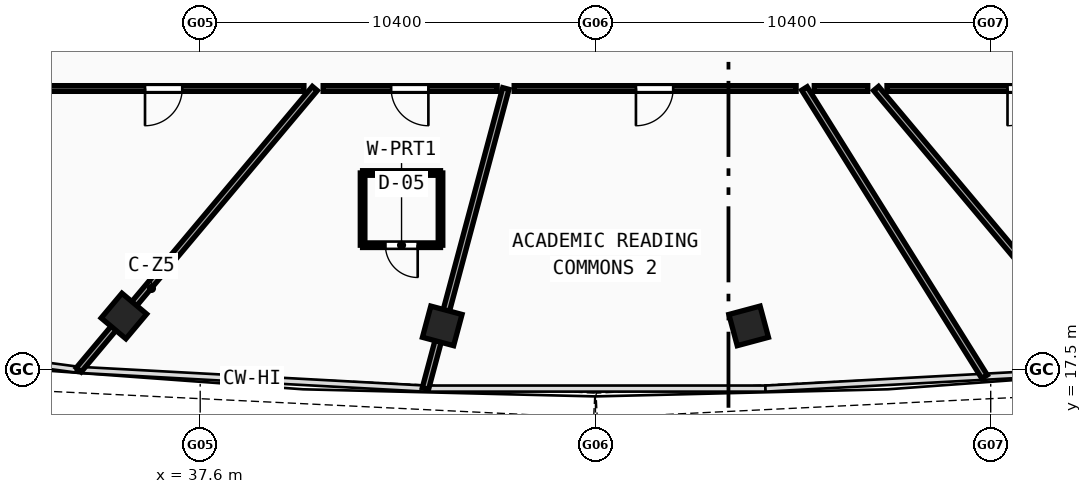
"""IFC4 building model, lengths in metres.
Left out: names, types, materials, properties, quantities, classifications, styles, units other than length and angle.
Written with IfcOpenShell. Run it as: python <this file> out.ifc"""

import sys

from ifc_helpers import new_model, si_unit, direction, frame, frame_2d, origin, origin_with_axes, origin_2d, place, context, subcontext, project, spatial, rectangle, hollow_rectangle, extrude, source, transform, mapped, element, fill, save


model = new_model("IFC4")
c1 = context("Model", 3, precision=1e-05, world=origin(), true_north=direction((0.0, 1.0)))
c2 = subcontext(c1, "Body", "Model", "MODEL_VIEW")
j1 = project(units=[si_unit("LENGTHUNIT", "METRE"), si_unit("PLANEANGLEUNIT", "RADIAN")], contexts=[c1])
p1 = place(None, origin())
s1 = spatial("IfcSite", under=j1, at=p1, CompositionType="ELEMENT")
p2 = place(p1, origin())
s2 = spatial("IfcBuilding", under=s1, at=p2, CompositionType="ELEMENT")
p3 = place(p2, frame((0.0, 0.0, 259.45)))
s3 = spatial("IfcBuildingStorey", under=s2, at=p3, CompositionType="ELEMENT", Elevation=259.45)
m1 = source(origin(), c2, "Body", "SweptSolid", [
    extrude(hollow_rectangle(XDim=0.85, YDim=0.85, WallThickness=0.034, at=origin_2d()), origin(), (0.0, 0.0, 1.0), 3.73),
])
for number, where, z_axis, x_axis in (
    (1, (35.593, 18.914, -0.26), (0.0, 0.0, 1.0), (0.766, -0.643, 0.0)),
    (2, (43.969, 18.654, -0.26), (0.0, 0.0, 1.0), (0.966, -0.259, 0.0)),
    (3, (52.031, 18.654, -0.26), (0.0, 0.0, 1.0), (0.966, 0.259, 0.0)),
):
    element("IfcColumn", number, at=place(p3, frame(where, z_axis=z_axis, x_axis=x_axis)), inside=s3, PredefinedType="COLUMN", context=c2, shape_type="MappedRepresentation", body=[
        mapped(m1, transform((0.0, 0.0, 0.0), scale=1.0)),
    ])
p4 = place(p3, frame((40.616, 24.9, 0.0), z_axis=(0.0, 0.0, 1.0), x_axis=(-0.642795010628, -0.766038232931, 0.0)))
e4 = element("IfcWall", 4, at=p4, inside=s3, PredefinedType="PARTITIONING", context=c2, shape_type="SweptSolid", body=[
    extrude(rectangle(XDim=9.663, YDim=0.17, at=frame_2d((4.832, 0.0))), origin(), (0.0, 0.0, 1.0), 2.82),
])
p5 = place(p3, frame((45.642, 24.9, 0.0), z_axis=(0.0, 0.0, 1.0), x_axis=(-0.258833622746, -0.965921920103, 0.0)))
e5 = element("IfcWall", 5, at=p5, inside=s3, PredefinedType="PARTITIONING", context=c2, shape_type="SweptSolid", body=[
    extrude(rectangle(XDim=8.174, YDim=0.17, at=frame_2d((4.087, 0.0))), origin(), (0.0, 0.0, 1.0), 2.82),
])
p6 = place(p3, frame((53.499, 24.9, 0.0), z_axis=(0.0, 0.0, 1.0), x_axis=(0.529920411872, -0.848047379031, 0.0)))
e6 = element("IfcWall", 6, at=p6, inside=s3, PredefinedType="PARTITIONING", context=c2, shape_type="SweptSolid", body=[
    extrude(rectangle(XDim=8.943, YDim=0.17, at=frame_2d((4.471, 0.0))), origin(), (0.0, 0.0, 1.0), 2.82),
])
p7 = place(p3, frame((55.384, 24.9, 0.0), z_axis=(0.0, 0.0, 1.0), x_axis=(0.642795010628, -0.766038232931, 0.0)))
e7 = element("IfcWall", 7, at=p7, inside=s3, PredefinedType="PARTITIONING", context=c2, shape_type="SweptSolid", body=[
    extrude(rectangle(XDim=9.663, YDim=0.17, at=frame_2d((4.832, 0.0))), origin(), (0.0, 0.0, 1.0), 2.82),
])
p8 = place(p3, frame((62.85, 24.9, 0.0), z_axis=(0.0, 0.0, 1.0), x_axis=(-1.0, 0.0, 0.0)))
e8 = element("IfcWall", 8, at=p8, inside=s3, PredefinedType="PARTITIONING", context=c2, shape_type="SweptSolid", body=[
    extrude(rectangle(XDim=7.179, YDim=0.15, at=frame_2d((3.589, 0.0))), origin(), (0.0, 0.0, 1.0), 3.12),
])
p9 = place(p8, frame((3.028, 0.0, 0.0)))
e9 = element("IfcOpeningElement", 9, at=p9, cuts=e8, PredefinedType="OPENING", context=c2, shape_type="SweptSolid", body=[
    extrude(rectangle(XDim=0.98, YDim=2.12, at=frame_2d((0.49, 1.06))), frame((0.0, 0.085, 0.0), z_axis=(0.0, -1.0, 0.0), x_axis=(1.0, 0.0, 0.0)), (0.0, 0.0, 1.0), 0.17),
])
p10 = place(p3, frame((55.164, 24.9, 0.0), z_axis=(0.0, 0.0, 1.0), x_axis=(-1.0, 0.0, 0.0)))
e10 = element("IfcWall", 10, at=p10, inside=s3, PredefinedType="PARTITIONING", context=c2, shape_type="SweptSolid", body=[
    extrude(rectangle(XDim=1.406, YDim=0.15, at=frame_2d((0.703, 0.0))), origin(), (0.0, 0.0, 1.0), 2.82),
])
p11 = place(p3, frame((53.279, 24.9, 0.0), z_axis=(0.0, 0.0, 1.0), x_axis=(-1.0, 0.0, 0.0)))
e11 = element("IfcWall", 11, at=p11, inside=s3, PredefinedType="PARTITIONING", context=c2, shape_type="SweptSolid", body=[
    extrude(rectangle(XDim=7.417, YDim=0.15, at=frame_2d((3.708, 0.0))), origin(), (0.0, 0.0, 1.0), 2.82),
])
p12 = place(p11, frame((3.234, 0.0, 0.0)))
e12 = element("IfcOpeningElement", 12, at=p12, cuts=e11, PredefinedType="OPENING", context=c2, shape_type="SweptSolid", body=[
    extrude(rectangle(XDim=0.98, YDim=2.12, at=frame_2d((0.49, 1.06))), frame((0.0, 0.085, 0.0), z_axis=(0.0, -1.0, 0.0), x_axis=(1.0, 0.0, 0.0)), (0.0, 0.0, 1.0), 0.17),
])
p13 = place(p3, frame((45.414, 24.9, 0.0), z_axis=(0.0, 0.0, 1.0), x_axis=(-1.0, 0.0, 0.0)))
e13 = element("IfcWall", 13, at=p13, inside=s3, PredefinedType="PARTITIONING", context=c2, shape_type="SweptSolid", body=[
    extrude(rectangle(XDim=4.579, YDim=0.15, at=frame_2d((2.289, 0.0))), origin(), (0.0, 0.0, 1.0), 2.82),
])
p14 = place(p13, frame((1.81, 0.0, 0.0)))
e14 = element("IfcOpeningElement", 14, at=p14, cuts=e13, PredefinedType="OPENING", context=c2, shape_type="SweptSolid", body=[
    extrude(rectangle(XDim=0.98, YDim=2.12, at=frame_2d((0.49, 1.06))), frame((0.0, 0.085, 0.0), z_axis=(0.0, -1.0, 0.0), x_axis=(1.0, 0.0, 0.0)), (0.0, 0.0, 1.0), 0.17),
])
p15 = place(p3, frame((40.329, 24.9, 0.0), z_axis=(0.0, 0.0, 1.0), x_axis=(-1.0, 0.0, 0.0)))
e15 = element("IfcWall", 15, at=p15, inside=s3, PredefinedType="PARTITIONING", context=c2, shape_type="SweptSolid", body=[
    extrude(rectangle(XDim=7.179, YDim=0.15, at=frame_2d((3.589, 0.0))), origin(), (0.0, 0.0, 1.0), 3.12),
])
p16 = place(p15, frame((3.201, 0.0, 0.0)))
e16 = element("IfcOpeningElement", 16, at=p16, cuts=e15, PredefinedType="OPENING", context=c2, shape_type="SweptSolid", body=[
    extrude(rectangle(XDim=0.98, YDim=2.12, at=frame_2d((0.49, 1.06))), frame((0.0, 0.085, 0.0), z_axis=(0.0, -1.0, 0.0), x_axis=(1.0, 0.0, 0.0)), (0.0, 0.0, 1.0), 0.17),
])
p17 = place(p3, frame((41.873, 20.777, 0.0), z_axis=(0.0, 0.0, 1.0), x_axis=(1.0, 0.0, 0.0)))
e17 = element("IfcWall", 17, at=p17, inside=s3, PredefinedType="PARTITIONING", context=c2, shape_type="SweptSolid", body=[
    extrude(rectangle(XDim=2.05, YDim=0.12, at=frame_2d((1.025, 0.0))), origin(), (0.0, 0.0, 1.0), 3.47),
])
p18 = place(p17, frame((0.6, 0.0, 0.0)))
e18 = element("IfcOpeningElement", 18, at=p18, cuts=e17, PredefinedType="OPENING", context=c2, shape_type="SweptSolid", body=[
    extrude(rectangle(XDim=0.85, YDim=2.1, at=frame_2d((0.425, 1.05))), frame((0.0, 0.07, 0.0), z_axis=(0.0, -1.0, 0.0), x_axis=(1.0, 0.0, 0.0)), (0.0, 0.0, 1.0), 0.14),
])
p19 = place(p3, frame((43.923, 20.777, 0.0), z_axis=(0.0, 0.0, 1.0), x_axis=(0.0, 1.0, 0.0)))
e19 = element("IfcWall", 19, at=p19, inside=s3, PredefinedType="PARTITIONING", context=c2, shape_type="SweptSolid", body=[
    extrude(rectangle(XDim=1.9, YDim=0.12, at=frame_2d((0.95, 0.0))), origin(), (0.0, 0.0, 1.0), 3.12),
])
p20 = place(p3, frame((43.923, 22.677, 0.0), z_axis=(0.0, 0.0, 1.0), x_axis=(-1.0, 0.0, 0.0)))
e20 = element("IfcWall", 20, at=p20, inside=s3, PredefinedType="PARTITIONING", context=c2, shape_type="SweptSolid", body=[
    extrude(rectangle(XDim=2.05, YDim=0.12, at=frame_2d((1.025, 0.0))), origin(), (0.0, 0.0, 1.0), 3.47),
])
p21 = place(p3, frame((41.873, 22.677, 0.0), z_axis=(0.0, 0.0, 1.0), x_axis=(0.0, -1.0, 0.0)))
e21 = element("IfcWall", 21, at=p21, inside=s3, PredefinedType="PARTITIONING", context=c2, shape_type="SweptSolid", body=[
    extrude(rectangle(XDim=1.9, YDim=0.12, at=frame_2d((0.95, 0.0))), origin(), (0.0, 0.0, 1.0), 3.12),
])
m2 = source(origin(), c2, "Body", "SweptSolid", [
    extrude(rectangle(XDim=0.98, YDim=2.12, at=frame_2d((0.49, 1.06))), frame((0.0, 0.025, 0.0), z_axis=(0.0, -1.0, 0.0), x_axis=(1.0, 0.0, 0.0)), (0.0, 0.0, 1.0), 0.05),
])
p22 = place(p16, origin_with_axes())
e22 = element("IfcDoor", 22, at=p22, inside=s3, OperationType="SINGLE_SWING_RIGHT", PredefinedType="DOOR", context=c2, shape_type="MappedRepresentation", body=[
    mapped(m2, transform((0.0, 0.0, 0.0), scale=1.0)),
])
fill(e16, e22)
p23 = place(p14, origin_with_axes())
e23 = element("IfcDoor", 23, at=p23, inside=s3, OperationType="SINGLE_SWING_LEFT", PredefinedType="DOOR", context=c2, shape_type="MappedRepresentation", body=[
    mapped(m2, transform((0.0, 0.0, 0.0), scale=1.0)),
])
fill(e14, e23)
m3 = source(origin(), c2, "Body", "SweptSolid", [
    extrude(rectangle(XDim=0.85, YDim=2.1, at=frame_2d((0.425, 1.05))), frame((0.0, 0.025, 0.0), z_axis=(0.0, -1.0, 0.0), x_axis=(1.0, 0.0, 0.0)), (0.0, 0.0, 1.0), 0.05),
])
p24 = place(p18, frame((0.85, 0.0, 0.0), z_axis=(0.0, 0.0, 1.0), x_axis=(-1.0, 0.0, 0.0)))
e24 = element("IfcDoor", 24, at=p24, inside=s3, OperationType="SINGLE_SWING_LEFT", PredefinedType="DOOR", context=c2, shape_type="MappedRepresentation", body=[
    mapped(m3, transform((0.0, 0.0, 0.0), scale=1.0)),
])
fill(e18, e24)
p25 = place(p12, origin_with_axes())
e25 = element("IfcDoor", 25, at=p25, inside=s3, OperationType="SINGLE_SWING_RIGHT", PredefinedType="DOOR", context=c2, shape_type="MappedRepresentation", body=[
    mapped(m2, transform((0.0, 0.0, 0.0), scale=1.0)),
])
fill(e12, e25)
p26 = place(p9, origin_with_axes())
e26 = element("IfcDoor", 26, at=p26, inside=s3, OperationType="SINGLE_SWING_RIGHT", PredefinedType="DOOR", context=c2, shape_type="MappedRepresentation", body=[
    mapped(m2, transform((0.0, 0.0, 0.0), scale=1.0)),
])
fill(e9, e26)
save(model, sys.argv[1])
